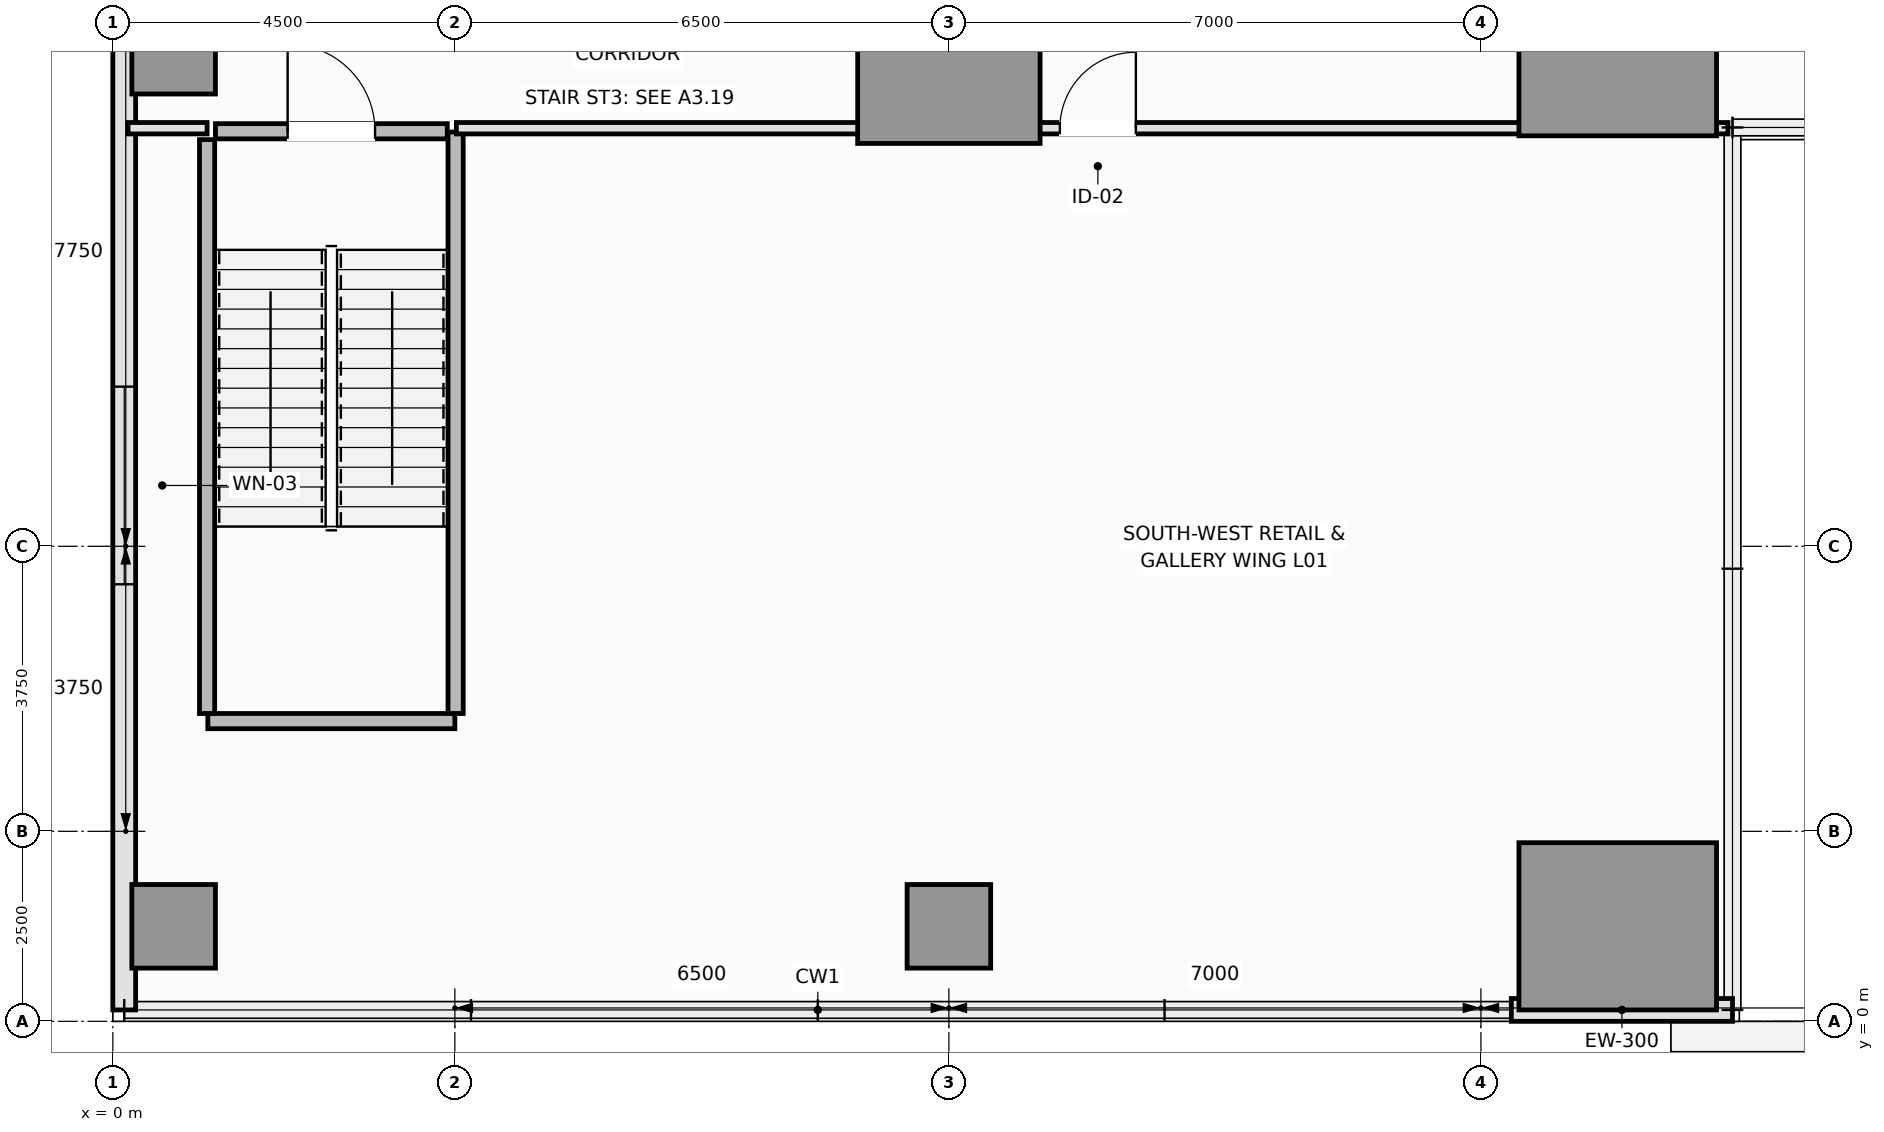
"""IFC4 building model, lengths in metres.
Left out: names, types, materials, properties, quantities, classifications, styles, units other than length and angle.
Written with IfcOpenShell. Run it as: python <this file> out.ifc"""

import sys

from ifc_helpers import new_model, si_unit, direction, frame, frame_2d, origin, origin_2d, place, context, subcontext, project, spatial, rectangle, extrude, element, fill, save


model = new_model("IFC4")
c1 = context("Model", 3, precision=1e-05, world=origin(), true_north=direction((0.0, 1.0)))
c2 = subcontext(c1, "Body", "Model", "MODEL_VIEW")
j1 = project(units=[si_unit("LENGTHUNIT", "METRE"), si_unit("PLANEANGLEUNIT", "RADIAN")], contexts=[c1])
p1 = place(None, origin())
s1 = spatial("IfcSite", under=j1, at=p1, CompositionType="ELEMENT")
p2 = place(p1, origin())
s2 = spatial("IfcBuilding", under=s1, at=p2, CompositionType="ELEMENT")
p3 = place(p2, frame((0.0, 0.0, 6.0)))
s3 = spatial("IfcBuildingStorey", under=s2, at=p3, CompositionType="ELEMENT", Elevation=6.0)
p4 = place(p3, frame((11.0, 12.75, 0.0), z_axis=(0.0, 0.0, 1.0), x_axis=(1.0, 0.0, 0.0)))
e1 = element("IfcColumn", 1, at=p4, inside=s3, PredefinedType="COLUMN", context=c2, shape_type="SweptSolid", body=[
    extrude(rectangle(XDim=2.4, YDim=2.4, at=origin_2d()), origin(), (0.0, 0.0, 1.0), 4.8),
])
for number, where, z_axis, x_axis in (
    (2, (19.8, 1.25, 0.0), (0.0, 0.0, 1.0), (1.0, 0.0, 0.0)),
    (3, (19.8, 12.75, 0.0), (0.0, 0.0, 1.0), (1.0, 0.0, 0.0)),
):
    element("IfcColumn", number, at=place(p3, frame(where, z_axis=z_axis, x_axis=x_axis)), inside=s3, PredefinedType="COLUMN", context=c2, shape_type="SweptSolid", body=[
        extrude(rectangle(XDim=2.6, YDim=2.2, at=origin_2d()), origin(), (0.0, 0.0, 1.0), 4.8),
    ])
for number, where, z_axis, x_axis in (
    (4, (0.8, 1.25, 0.0), (0.0, 0.0, 1.0), (1.0, 0.0, 0.0)),
    (5, (0.8, 12.75, 0.0), (0.0, 0.0, 1.0), (1.0, 0.0, 0.0)),
    (6, (11.0, 1.25, 0.0), (0.0, 0.0, 1.0), (1.0, 0.0, 0.0)),
):
    element("IfcColumn", number, at=place(p3, frame(where, z_axis=z_axis, x_axis=x_axis)), inside=s3, PredefinedType="COLUMN", context=c2, shape_type="SweptSolid", body=[
        extrude(rectangle(XDim=1.1, YDim=1.1, at=origin_2d()), origin(), (0.0, 0.0, 1.0), 4.8),
    ])
p5 = place(p3, frame((0.15, 50.35, 0.0), z_axis=(0.0, 0.0, 1.0), x_axis=(0.0, -1.0, 0.0)))
e7 = element("IfcWall", 7, at=p5, inside=s3, PredefinedType="SOLIDWALL", context=c2, shape_type="SweptSolid", body=[
    extrude(rectangle(XDim=50.2, YDim=0.3, at=frame_2d((25.1, 0.0))), origin(), (0.0, 0.0, 1.0), 4.6),
])
p6 = place(p5, frame((6.5, 0.0, 0.9)))
e8 = element("IfcOpeningElement", 8, at=p6, cuts=e7, PredefinedType="OPENING", context=c2, shape_type="SweptSolid", body=[
    extrude(rectangle(XDim=2.6, YDim=2.2, at=frame_2d((1.3, 1.1))), frame((0.0, 0.16, 0.0), z_axis=(0.0, -1.0, 0.0), x_axis=(1.0, 0.0, 0.0)), (0.0, 0.0, 1.0), 0.32),
])
p7 = place(p5, frame((42.0, 0.0, 0.9)))
e9 = element("IfcOpeningElement", 9, at=p7, cuts=e7, PredefinedType="OPENING", context=c2, shape_type="SweptSolid", body=[
    extrude(rectangle(XDim=2.6, YDim=2.2, at=frame_2d((1.3, 1.1))), frame((0.0, 0.16, 0.0), z_axis=(0.0, -1.0, 0.0), x_axis=(1.0, 0.0, 0.0)), (0.0, 0.0, 1.0), 0.32),
])
p8 = place(p3, frame((18.4, 0.15, 0.0), z_axis=(0.0, 0.0, 1.0), x_axis=(1.0, 0.0, 0.0)))
e10 = element("IfcWall", 10, at=p8, inside=s3, PredefinedType="SOLIDWALL", context=c2, shape_type="SweptSolid", body=[
    extrude(rectangle(XDim=2.91, YDim=0.3, at=frame_2d((1.455, 0.0))), origin(), (0.0, 0.0, 1.0), 4.6),
])
p9 = place(p3, frame((1.25, 3.95, 0.0), z_axis=(0.0, 0.0, 1.0), x_axis=(1.0, 0.0, 0.0)))
e11 = element("IfcWall", 11, at=p9, inside=s3, PredefinedType="SOLIDWALL", context=c2, shape_type="SweptSolid", body=[
    extrude(rectangle(XDim=3.25, YDim=0.2, at=frame_2d((1.625, 0.0))), origin(), (0.0, 0.0, 1.0), 4.8),
])
p10 = place(p3, frame((1.24, 4.05, 0.0), z_axis=(0.0, 0.0, 1.0), x_axis=(0.0, 1.0, 0.0)))
e12 = element("IfcWall", 12, at=p10, inside=s3, PredefinedType="SOLIDWALL", context=c2, shape_type="SweptSolid", body=[
    extrude(rectangle(XDim=7.55, YDim=0.2, at=frame_2d((3.775, 0.0))), origin(), (0.0, 0.0, 1.0), 4.8),
])
p11 = place(p3, frame((4.51, 4.05, 0.0), z_axis=(0.0, 0.0, 1.0), x_axis=(0.0, 1.0, 0.0)))
e13 = element("IfcWall", 13, at=p11, inside=s3, PredefinedType="SOLIDWALL", context=c2, shape_type="SweptSolid", body=[
    extrude(rectangle(XDim=7.65, YDim=0.2, at=frame_2d((3.825, 0.0))), origin(), (0.0, 0.0, 1.0), 4.8),
])
p12 = place(p3, frame((1.35, 11.71, 0.0), z_axis=(0.0, 0.0, 1.0), x_axis=(1.0, 0.0, 0.0)))
e14 = element("IfcWall", 14, at=p12, inside=s3, PredefinedType="SOLIDWALL", context=c2, shape_type="SweptSolid", body=[
    extrude(rectangle(XDim=3.05, YDim=0.2, at=frame_2d((1.525, 0.0))), origin(), (0.0, 0.0, 1.0), 4.8),
])
p13 = place(p12, frame((0.95, 0.0, 0.0)))
e15 = element("IfcOpeningElement", 15, at=p13, cuts=e14, PredefinedType="OPENING", context=c2, shape_type="SweptSolid", body=[
    extrude(rectangle(XDim=1.15, YDim=2.15, at=frame_2d((0.575, 1.075))), frame((0.0, 0.11, 0.0), z_axis=(0.0, -1.0, 0.0), x_axis=(1.0, 0.0, 0.0)), (0.0, 0.0, 1.0), 0.22),
])
p14 = place(p3, frame((0.2, 11.75, 0.0), z_axis=(0.0, 0.0, 1.0), x_axis=(1.0, 0.0, 0.0)))
e16 = element("IfcWall", 16, at=p14, inside=s3, PredefinedType="PARTITIONING", context=c2, shape_type="SweptSolid", body=[
    extrude(rectangle(XDim=1.04, YDim=0.15, at=frame_2d((0.52, 0.0))), origin(), (0.0, 0.0, 1.0), 4.6),
])
p15 = place(p3, frame((4.52, 11.75, 0.0), z_axis=(0.0, 0.0, 1.0), x_axis=(1.0, 0.0, 0.0)))
e17 = element("IfcWall", 17, at=p15, inside=s3, PredefinedType="PARTITIONING", context=c2, shape_type="SweptSolid", body=[
    extrude(rectangle(XDim=16.73, YDim=0.15, at=frame_2d((8.365, 0.0))), origin(), (0.0, 0.0, 1.0), 4.6),
])
p16 = place(p15, frame((7.94, 0.0, 0.0)))
e18 = element("IfcOpeningElement", 18, at=p16, cuts=e17, PredefinedType="OPENING", context=c2, shape_type="SweptSolid", body=[
    extrude(rectangle(XDim=1.0, YDim=2.15, at=frame_2d((0.5, 1.075))), frame((0.0, 0.085, 0.0), z_axis=(0.0, -1.0, 0.0), x_axis=(1.0, 0.0, 0.0)), (0.0, 0.0, 1.0), 0.17),
])
p17 = place(p7, origin())
e19 = element("IfcWindow", 19, at=p17, inside=s3, PartitioningType="SINGLE_PANEL", PredefinedType="WINDOW", context=c2, shape_type="SweptSolid", body=[
    extrude(rectangle(XDim=2.6, YDim=2.2, at=frame_2d((1.3, 1.1))), frame((0.0, 0.03, 0.0), z_axis=(0.0, -1.0, 0.0), x_axis=(1.0, 0.0, 0.0)), (0.0, 0.0, 1.0), 0.06),
])
fill(e9, e19)
p18 = place(p13, origin())
e20 = element("IfcDoor", 20, at=p18, inside=s3, OperationType="SINGLE_SWING_LEFT", PredefinedType="DOOR", context=c2, shape_type="SweptSolid", body=[
    extrude(rectangle(XDim=1.15, YDim=2.15, at=frame_2d((0.575, 1.075))), frame((0.0, 0.025, 0.0), z_axis=(0.0, -1.0, 0.0), x_axis=(1.0, 0.0, 0.0)), (0.0, 0.0, 1.0), 0.05),
])
fill(e15, e20)
p19 = place(p16, origin())
e21 = element("IfcDoor", 21, at=p19, inside=s3, OperationType="SINGLE_SWING_RIGHT", PredefinedType="DOOR", context=c2, shape_type="SweptSolid", body=[
    extrude(rectangle(XDim=1.0, YDim=2.15, at=frame_2d((0.5, 1.075))), frame((0.0, 0.025, 0.0), z_axis=(0.0, -1.0, 0.0), x_axis=(1.0, 0.0, 0.0)), (0.0, 0.0, 1.0), 0.05),
])
fill(e18, e21)
save(model, sys.argv[1])
